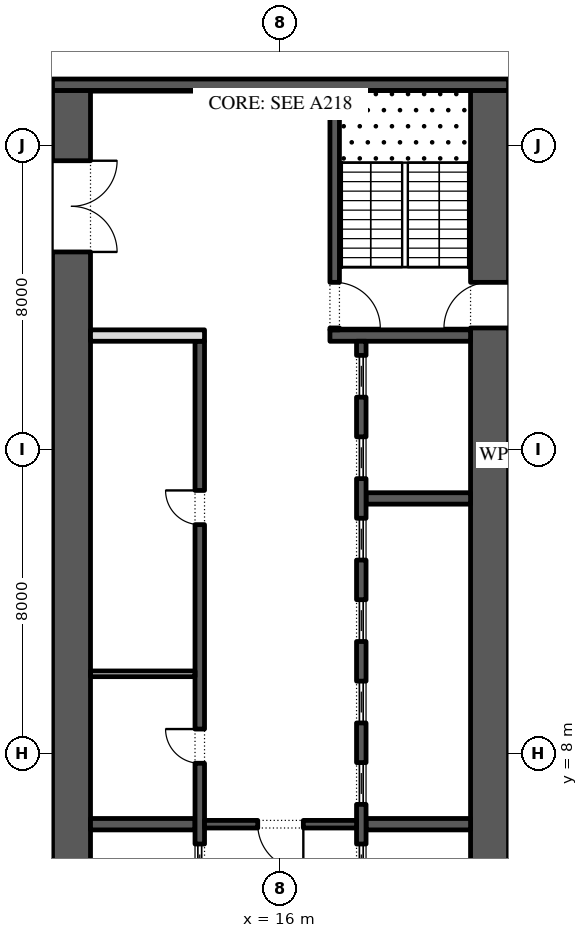
"""IFC4 building model, lengths in metres.
Left out: names, types, materials, properties, quantities, classifications, styles, units other than length and angle.
Written with IfcOpenShell. Run it as: python <this file> out.ifc"""

import sys

from ifc_helpers import new_model, si_unit, direction, frame, frame_2d, origin, place, context, subcontext, project, spatial, rectangle, extrude, element, fill, save


model = new_model("IFC4")
c1 = context("Model", 3, precision=1e-05, world=origin(), true_north=direction((0.0, 1.0)))
c2 = subcontext(c1, "Body", "Model", "MODEL_VIEW")
j1 = project(units=[si_unit("LENGTHUNIT", "METRE"), si_unit("PLANEANGLEUNIT", "RADIAN")], contexts=[c1])
p1 = place(None, origin())
s1 = spatial("IfcSite", under=j1, at=p1, CompositionType="ELEMENT")
p2 = place(p1, origin())
s2 = spatial("IfcBuilding", under=s1, at=p2, CompositionType="ELEMENT")
p3 = place(p2, frame((0.0, 0.0, 73.2)))
s3 = spatial("IfcBuildingStorey", under=s2, at=p3, CompositionType="ELEMENT", Elevation=73.2)
p4 = place(p3, frame((21.5, -2.45, 0.0), z_axis=(0.0, 0.0, 1.0), x_axis=(0.0, 1.0, 0.0)))
e1 = element("IfcWall", 1, at=p4, inside=s3, PredefinedType="SHEAR", context=c2, shape_type="SweptSolid", body=[
    extrude(rectangle(XDim=27.9, YDim=1.0, at=frame_2d((13.95, 0.0))), origin(), (0.0, 0.0, 1.0), 4.0),
])
p5 = place(p4, frame((5.05, 0.0, 0.0)))
e2 = element("IfcOpeningElement", 2, at=p5, cuts=e1, PredefinedType="OPENING", context=c2, shape_type="SweptSolid", body=[
    extrude(rectangle(XDim=1.2, YDim=2.1, at=frame_2d((0.6, 1.05))), frame((0.0, 0.51, 0.0), z_axis=(0.0, -1.0, 0.0), x_axis=(1.0, 0.0, 0.0)), (0.0, 0.0, 1.0), 1.02),
])
p6 = place(p4, frame((21.65, 0.0, 0.0)))
e3 = element("IfcOpeningElement", 3, at=p6, cuts=e1, PredefinedType="OPENING", context=c2, shape_type="SweptSolid", body=[
    extrude(rectangle(XDim=1.2, YDim=2.1, at=frame_2d((0.6, 1.05))), frame((0.0, 0.51, 0.0), z_axis=(0.0, -1.0, 0.0), x_axis=(1.0, 0.0, 0.0)), (0.0, 0.0, 1.0), 1.02),
])
p7 = place(p3, frame((10.5, -2.45, 0.0), z_axis=(0.0, 0.0, 1.0), x_axis=(0.0, 1.0, 0.0)))
e4 = element("IfcWall", 4, at=p7, inside=s3, PredefinedType="SHEAR", context=c2, shape_type="SweptSolid", body=[
    extrude(rectangle(XDim=27.9, YDim=1.0, at=frame_2d((13.95, 0.0))), origin(), (0.0, 0.0, 1.0), 4.0),
])
p8 = place(p7, frame((23.65, 0.0, 0.0)))
e5 = element("IfcOpeningElement", 5, at=p8, cuts=e4, PredefinedType="OPENING", context=c2, shape_type="SweptSolid", body=[
    extrude(rectangle(XDim=2.4, YDim=2.1, at=frame_2d((1.2, 1.05))), frame((0.0, 0.51, 0.0), z_axis=(0.0, -1.0, 0.0), x_axis=(1.0, 0.0, 0.0)), (0.0, 0.0, 1.0), 1.02),
])
p9 = place(p7, frame((2.7, 0.0, 0.0)))
e6 = element("IfcOpeningElement", 6, at=p9, cuts=e4, PredefinedType="OPENING", context=c2, shape_type="SweptSolid", body=[
    extrude(rectangle(XDim=0.9, YDim=2.1, at=frame_2d((0.45, 1.05))), frame((0.0, 0.51, 0.0), z_axis=(0.0, -1.0, 0.0), x_axis=(1.0, 0.0, 0.0)), (0.0, 0.0, 1.0), 1.02),
])
p10 = place(p3, frame((10.0, 25.6, 0.0), z_axis=(0.0, 0.0, 1.0), x_axis=(1.0, 0.0, 0.0)))
e7 = element("IfcWall", 7, at=p10, inside=s3, PredefinedType="SHEAR", context=c2, shape_type="SweptSolid", body=[
    extrude(rectangle(XDim=12.0, YDim=0.3, at=frame_2d((6.0, 0.0))), origin(), (0.0, 0.0, 1.0), 4.0),
])
p11 = place(p3, frame((17.3, 19.0, 0.0), z_axis=(0.0, 0.0, 1.0), x_axis=(1.0, 0.0, 0.0)))
e8 = element("IfcWall", 8, at=p11, inside=s3, PredefinedType="SHEAR", context=c2, shape_type="SweptSolid", body=[
    extrude(rectangle(XDim=3.7, YDim=0.3, at=frame_2d((1.85, 0.0))), origin(), (0.0, 0.0, 1.0), 4.0),
])
p12 = place(p3, frame((17.425, 19.15, 0.0), z_axis=(0.0, 0.0, 1.0), x_axis=(0.0, 1.0, 0.0)))
e9 = element("IfcWall", 9, at=p12, inside=s3, PredefinedType="SHEAR", context=c2, shape_type="SweptSolid", body=[
    extrude(rectangle(XDim=6.3, YDim=0.25, at=frame_2d((3.15, 0.0))), origin(), (0.0, 0.0, 1.0), 4.0),
])
p13 = place(p12, frame((0.05, 0.0, 0.0)))
e10 = element("IfcOpeningElement", 10, at=p13, cuts=e9, PredefinedType="OPENING", context=c2, shape_type="SweptSolid", body=[
    extrude(rectangle(XDim=1.2, YDim=2.1, at=frame_2d((0.6, 1.05))), frame((0.0, 0.135, 0.0), z_axis=(0.0, -1.0, 0.0), x_axis=(1.0, 0.0, 0.0)), (0.0, 0.0, 1.0), 0.27),
])
for number, where, z_axis, x_axis in (
    (11, (18.25, 6.143, 0.0), (0.0, 0.0, 1.0), (1.0, 0.0, 0.0)),
    (12, (18.25, 14.714, 0.0), (0.0, 0.0, 1.0), (1.0, 0.0, 0.0)),
):
    element("IfcWall", number, at=place(p3, frame(where, z_axis=z_axis, x_axis=x_axis)), inside=s3, PredefinedType="SHEAR", context=c2, shape_type="SweptSolid", body=[
        extrude(rectangle(XDim=2.75, YDim=0.3, at=frame_2d((1.375, 0.0))), origin(), (0.0, 0.0, 1.0), 4.0),
    ])
p14 = place(p3, frame((18.125, 4.15, 0.0), z_axis=(0.0, 0.0, 1.0), x_axis=(0.0, 1.0, 0.0)))
e13 = element("IfcWall", 13, at=p14, inside=s3, PredefinedType="SHEAR", context=c2, shape_type="SweptSolid", body=[
    extrude(rectangle(XDim=14.7, YDim=0.25, at=frame_2d((7.35, 0.0))), origin(), (0.0, 0.0, 1.0), 4.0),
])
p15 = place(p14, frame((0.371, 0.0, 0.0)))
e14 = element("IfcOpeningElement", 14, at=p15, cuts=e13, PredefinedType="OPENING", context=c2, shape_type="SweptSolid", body=[
    extrude(rectangle(XDim=1.1, YDim=2.1, at=frame_2d((0.55, 1.05))), frame((0.0, 0.135, 0.0), z_axis=(0.0, -1.0, 0.0), x_axis=(1.0, 0.0, 0.0)), (0.0, 0.0, 1.0), 0.27),
])
p16 = place(p14, frame((2.514, 0.0, 0.0)))
e15 = element("IfcOpeningElement", 15, at=p16, cuts=e13, PredefinedType="OPENING", context=c2, shape_type="SweptSolid", body=[
    extrude(rectangle(XDim=1.1, YDim=2.1, at=frame_2d((0.55, 1.05))), frame((0.0, 0.135, 0.0), z_axis=(0.0, -1.0, 0.0), x_axis=(1.0, 0.0, 0.0)), (0.0, 0.0, 1.0), 0.27),
])
p17 = place(p14, frame((4.657, 0.0, 0.0)))
e16 = element("IfcOpeningElement", 16, at=p17, cuts=e13, PredefinedType="OPENING", context=c2, shape_type="SweptSolid", body=[
    extrude(rectangle(XDim=1.1, YDim=2.1, at=frame_2d((0.55, 1.05))), frame((0.0, 0.135, 0.0), z_axis=(0.0, -1.0, 0.0), x_axis=(1.0, 0.0, 0.0)), (0.0, 0.0, 1.0), 0.27),
])
p18 = place(p14, frame((6.8, 0.0, 0.0)))
e17 = element("IfcOpeningElement", 17, at=p18, cuts=e13, PredefinedType="OPENING", context=c2, shape_type="SweptSolid", body=[
    extrude(rectangle(XDim=1.1, YDim=2.1, at=frame_2d((0.55, 1.05))), frame((0.0, 0.135, 0.0), z_axis=(0.0, -1.0, 0.0), x_axis=(1.0, 0.0, 0.0)), (0.0, 0.0, 1.0), 0.27),
])
p19 = place(p14, frame((8.943, 0.0, 0.0)))
e18 = element("IfcOpeningElement", 18, at=p19, cuts=e13, PredefinedType="OPENING", context=c2, shape_type="SweptSolid", body=[
    extrude(rectangle(XDim=1.1, YDim=2.1, at=frame_2d((0.55, 1.05))), frame((0.0, 0.135, 0.0), z_axis=(0.0, -1.0, 0.0), x_axis=(1.0, 0.0, 0.0)), (0.0, 0.0, 1.0), 0.27),
])
p20 = place(p14, frame((11.086, 0.0, 0.0)))
e19 = element("IfcOpeningElement", 19, at=p20, cuts=e13, PredefinedType="OPENING", context=c2, shape_type="SweptSolid", body=[
    extrude(rectangle(XDim=1.1, YDim=2.1, at=frame_2d((0.55, 1.05))), frame((0.0, 0.135, 0.0), z_axis=(0.0, -1.0, 0.0), x_axis=(1.0, 0.0, 0.0)), (0.0, 0.0, 1.0), 0.27),
])
p21 = place(p14, frame((13.229, 0.0, 0.0)))
e20 = element("IfcOpeningElement", 20, at=p21, cuts=e13, PredefinedType="OPENING", context=c2, shape_type="SweptSolid", body=[
    extrude(rectangle(XDim=1.1, YDim=2.1, at=frame_2d((0.55, 1.05))), frame((0.0, 0.135, 0.0), z_axis=(0.0, -1.0, 0.0), x_axis=(1.0, 0.0, 0.0)), (0.0, 0.0, 1.0), 0.27),
])
p22 = place(p3, frame((11.0, 6.143, 0.0), z_axis=(0.0, 0.0, 1.0), x_axis=(1.0, 0.0, 0.0)))
e21 = element("IfcWall", 21, at=p22, inside=s3, PredefinedType="SHEAR", context=c2, shape_type="SweptSolid", body=[
    extrude(rectangle(XDim=2.75, YDim=0.3, at=frame_2d((1.375, 0.0))), origin(), (0.0, 0.0, 1.0), 4.0),
])
p23 = place(p3, frame((13.875, -2.45, 0.0), z_axis=(0.0, 0.0, 1.0), x_axis=(0.0, 1.0, 0.0)))
e22 = element("IfcWall", 22, at=p23, inside=s3, PredefinedType="SHEAR", context=c2, shape_type="SweptSolid", body=[
    extrude(rectangle(XDim=21.3, YDim=0.25, at=frame_2d((10.65, 0.0))), origin(), (0.0, 0.0, 1.0), 4.0),
])
p24 = place(p23, frame((10.196, 0.0, 0.0)))
e23 = element("IfcOpeningElement", 23, at=p24, cuts=e22, PredefinedType="OPENING", context=c2, shape_type="SweptSolid", body=[
    extrude(rectangle(XDim=0.9, YDim=2.1, at=frame_2d((0.45, 1.05))), frame((0.0, 0.135, 0.0), z_axis=(0.0, -1.0, 0.0), x_axis=(1.0, 0.0, 0.0)), (0.0, 0.0, 1.0), 0.27),
])
p25 = place(p23, frame((16.475, 0.0, 0.0)))
e24 = element("IfcOpeningElement", 24, at=p25, cuts=e22, PredefinedType="OPENING", context=c2, shape_type="SweptSolid", body=[
    extrude(rectangle(XDim=0.9, YDim=2.1, at=frame_2d((0.45, 1.05))), frame((0.0, 0.135, 0.0), z_axis=(0.0, -1.0, 0.0), x_axis=(1.0, 0.0, 0.0)), (0.0, 0.0, 1.0), 0.27),
])
p26 = place(p23, frame((6.971, 0.0, 0.0)))
e25 = element("IfcOpeningElement", 25, at=p26, cuts=e22, PredefinedType="OPENING", context=c2, shape_type="SweptSolid", body=[
    extrude(rectangle(XDim=1.1, YDim=2.1, at=frame_2d((0.55, 1.05))), frame((0.0, 0.135, 0.0), z_axis=(0.0, -1.0, 0.0), x_axis=(1.0, 0.0, 0.0)), (0.0, 0.0, 1.0), 0.27),
])
p27 = place(p3, frame((11.0, 19.0, 0.0), z_axis=(0.0, 0.0, 1.0), x_axis=(1.0, 0.0, 0.0)))
e26 = element("IfcWall", 26, at=p27, inside=s3, PredefinedType="PARTITIONING", context=c2, shape_type="SweptSolid", body=[
    extrude(rectangle(XDim=3.0, YDim=0.3, at=frame_2d((1.5, 0.0))), origin(), (0.0, 0.0, 1.0), 4.0),
])
p28 = place(p3, frame((11.0, 10.1, 0.0), z_axis=(0.0, 0.0, 1.0), x_axis=(1.0, 0.0, 0.0)))
e27 = element("IfcWall", 27, at=p28, inside=s3, PredefinedType="PARTITIONING", context=c2, shape_type="SweptSolid", body=[
    extrude(rectangle(XDim=2.75, YDim=0.15, at=frame_2d((1.375, 0.0))), origin(), (0.0, 0.0, 1.0), 4.0),
])
p29 = place(p3, frame((14.0, 6.143, 0.0), z_axis=(0.0, 0.0, 1.0), x_axis=(1.0, 0.0, 0.0)))
e28 = element("IfcWall", 28, at=p29, inside=s3, PredefinedType="SHEAR", context=c2, shape_type="SweptSolid", body=[
    extrude(rectangle(XDim=4.0, YDim=0.2, at=frame_2d((2.0, 0.0))), origin(), (0.0, 0.0, 1.0), 4.0),
])
p30 = place(p29, frame((1.4, 0.0, 0.0)))
e29 = element("IfcOpeningElement", 29, at=p30, cuts=e28, PredefinedType="OPENING", context=c2, shape_type="SweptSolid", body=[
    extrude(rectangle(XDim=1.2, YDim=2.1, at=frame_2d((0.6, 1.05))), frame((0.0, 0.11, 0.0), z_axis=(0.0, -1.0, 0.0), x_axis=(1.0, 0.0, 0.0)), (0.0, 0.0, 1.0), 0.22),
])
p31 = place(p15, origin())
e30 = element("IfcDoor", 30, at=p31, inside=s3, OperationType="SLIDING_TO_LEFT", PredefinedType="DOOR", context=c2, shape_type="SweptSolid", body=[
    extrude(rectangle(XDim=1.1, YDim=2.1, at=frame_2d((0.55, 1.05))), frame((0.0, 0.025, 0.0), z_axis=(0.0, -1.0, 0.0), x_axis=(1.0, 0.0, 0.0)), (0.0, 0.0, 1.0), 0.05),
])
fill(e14, e30)
p32 = place(p16, origin())
e31 = element("IfcDoor", 31, at=p32, inside=s3, OperationType="SLIDING_TO_LEFT", PredefinedType="DOOR", context=c2, shape_type="SweptSolid", body=[
    extrude(rectangle(XDim=1.1, YDim=2.1, at=frame_2d((0.55, 1.05))), frame((0.0, 0.025, 0.0), z_axis=(0.0, -1.0, 0.0), x_axis=(1.0, 0.0, 0.0)), (0.0, 0.0, 1.0), 0.05),
])
fill(e15, e31)
p33 = place(p17, origin())
e32 = element("IfcDoor", 32, at=p33, inside=s3, OperationType="SLIDING_TO_LEFT", PredefinedType="DOOR", context=c2, shape_type="SweptSolid", body=[
    extrude(rectangle(XDim=1.1, YDim=2.1, at=frame_2d((0.55, 1.05))), frame((0.0, 0.025, 0.0), z_axis=(0.0, -1.0, 0.0), x_axis=(1.0, 0.0, 0.0)), (0.0, 0.0, 1.0), 0.05),
])
fill(e16, e32)
p34 = place(p18, origin())
e33 = element("IfcDoor", 33, at=p34, inside=s3, OperationType="SLIDING_TO_LEFT", PredefinedType="DOOR", context=c2, shape_type="SweptSolid", body=[
    extrude(rectangle(XDim=1.1, YDim=2.1, at=frame_2d((0.55, 1.05))), frame((0.0, 0.025, 0.0), z_axis=(0.0, -1.0, 0.0), x_axis=(1.0, 0.0, 0.0)), (0.0, 0.0, 1.0), 0.05),
])
fill(e17, e33)
p35 = place(p19, origin())
e34 = element("IfcDoor", 34, at=p35, inside=s3, OperationType="SLIDING_TO_LEFT", PredefinedType="DOOR", context=c2, shape_type="SweptSolid", body=[
    extrude(rectangle(XDim=1.1, YDim=2.1, at=frame_2d((0.55, 1.05))), frame((0.0, 0.025, 0.0), z_axis=(0.0, -1.0, 0.0), x_axis=(1.0, 0.0, 0.0)), (0.0, 0.0, 1.0), 0.05),
])
fill(e18, e34)
p36 = place(p20, origin())
e35 = element("IfcDoor", 35, at=p36, inside=s3, OperationType="SLIDING_TO_LEFT", PredefinedType="DOOR", context=c2, shape_type="SweptSolid", body=[
    extrude(rectangle(XDim=1.1, YDim=2.1, at=frame_2d((0.55, 1.05))), frame((0.0, 0.025, 0.0), z_axis=(0.0, -1.0, 0.0), x_axis=(1.0, 0.0, 0.0)), (0.0, 0.0, 1.0), 0.05),
])
fill(e19, e35)
p37 = place(p21, origin())
e36 = element("IfcDoor", 36, at=p37, inside=s3, OperationType="SLIDING_TO_LEFT", PredefinedType="DOOR", context=c2, shape_type="SweptSolid", body=[
    extrude(rectangle(XDim=1.1, YDim=2.1, at=frame_2d((0.55, 1.05))), frame((0.0, 0.025, 0.0), z_axis=(0.0, -1.0, 0.0), x_axis=(1.0, 0.0, 0.0)), (0.0, 0.0, 1.0), 0.05),
])
fill(e20, e36)
p38 = place(p24, origin())
e37 = element("IfcDoor", 37, at=p38, inside=s3, OperationType="SINGLE_SWING_LEFT", PredefinedType="DOOR", context=c2, shape_type="SweptSolid", body=[
    extrude(rectangle(XDim=0.9, YDim=2.1, at=frame_2d((0.45, 1.05))), frame((0.0, 0.125, 0.0), z_axis=(0.0, -1.0, 0.0), x_axis=(1.0, 0.0, 0.0)), (0.0, 0.0, 1.0), 0.05),
])
fill(e23, e37)
p39 = place(p25, origin())
e38 = element("IfcDoor", 38, at=p39, inside=s3, OperationType="SINGLE_SWING_LEFT", PredefinedType="DOOR", context=c2, shape_type="SweptSolid", body=[
    extrude(rectangle(XDim=0.9, YDim=2.1, at=frame_2d((0.45, 1.05))), frame((0.0, 0.125, 0.0), z_axis=(0.0, -1.0, 0.0), x_axis=(1.0, 0.0, 0.0)), (0.0, 0.0, 1.0), 0.05),
])
fill(e24, e38)
p40 = place(p26, origin())
e39 = element("IfcDoor", 39, at=p40, inside=s3, OperationType="SLIDING_TO_LEFT", PredefinedType="DOOR", context=c2, shape_type="SweptSolid", body=[
    extrude(rectangle(XDim=1.1, YDim=2.1, at=frame_2d((0.55, 1.05))), frame((0.0, 0.025, 0.0), z_axis=(0.0, -1.0, 0.0), x_axis=(1.0, 0.0, 0.0)), (0.0, 0.0, 1.0), 0.05),
])
fill(e25, e39)
p41 = place(p30, frame((1.2, 0.0, 0.0), z_axis=(0.0, 0.0, 1.0), x_axis=(-1.0, 0.0, 0.0)))
e40 = element("IfcDoor", 40, at=p41, inside=s3, OperationType="SINGLE_SWING_RIGHT", PredefinedType="DOOR", context=c2, shape_type="SweptSolid", body=[
    extrude(rectangle(XDim=1.2, YDim=2.1, at=frame_2d((0.6, 1.05))), frame((0.0, 0.025, 0.0), z_axis=(0.0, -1.0, 0.0), x_axis=(1.0, 0.0, 0.0)), (0.0, 0.0, 1.0), 0.05),
])
fill(e29, e40)
p42 = place(p8, frame((2.4, 0.0, 0.0), z_axis=(0.0, 0.0, 1.0), x_axis=(-1.0, 0.0, 0.0)))
e41 = element("IfcDoor", 41, at=p42, inside=s3, OperationType="DOUBLE_DOOR_SINGLE_SWING", PredefinedType="DOOR", context=c2, shape_type="SweptSolid", body=[
    extrude(rectangle(XDim=2.4, YDim=2.1, at=frame_2d((1.2, 1.05))), frame((0.0, 0.025, 0.0), z_axis=(0.0, -1.0, 0.0), x_axis=(1.0, 0.0, 0.0)), (0.0, 0.0, 1.0), 0.05),
])
fill(e5, e41)
p43 = place(p13, frame((1.2, 0.0, 0.0), z_axis=(0.0, 0.0, 1.0), x_axis=(-1.0, 0.0, 0.0)))
e42 = element("IfcDoor", 42, at=p43, inside=s3, OperationType="SINGLE_SWING_LEFT", PredefinedType="DOOR", context=c2, shape_type="SweptSolid", body=[
    extrude(rectangle(XDim=1.2, YDim=2.1, at=frame_2d((0.6, 1.05))), frame((0.0, 0.025, 0.0), z_axis=(0.0, -1.0, 0.0), x_axis=(1.0, 0.0, 0.0)), (0.0, 0.0, 1.0), 0.05),
])
fill(e10, e42)
p44 = place(p6, origin())
e43 = element("IfcDoor", 43, at=p44, inside=s3, OperationType="SINGLE_SWING_RIGHT", PredefinedType="DOOR", context=c2, shape_type="SweptSolid", body=[
    extrude(rectangle(XDim=1.2, YDim=2.1, at=frame_2d((0.6, 1.05))), frame((0.0, 0.025, 0.0), z_axis=(0.0, -1.0, 0.0), x_axis=(1.0, 0.0, 0.0)), (0.0, 0.0, 1.0), 0.05),
])
fill(e3, e43)
save(model, sys.argv[1])
